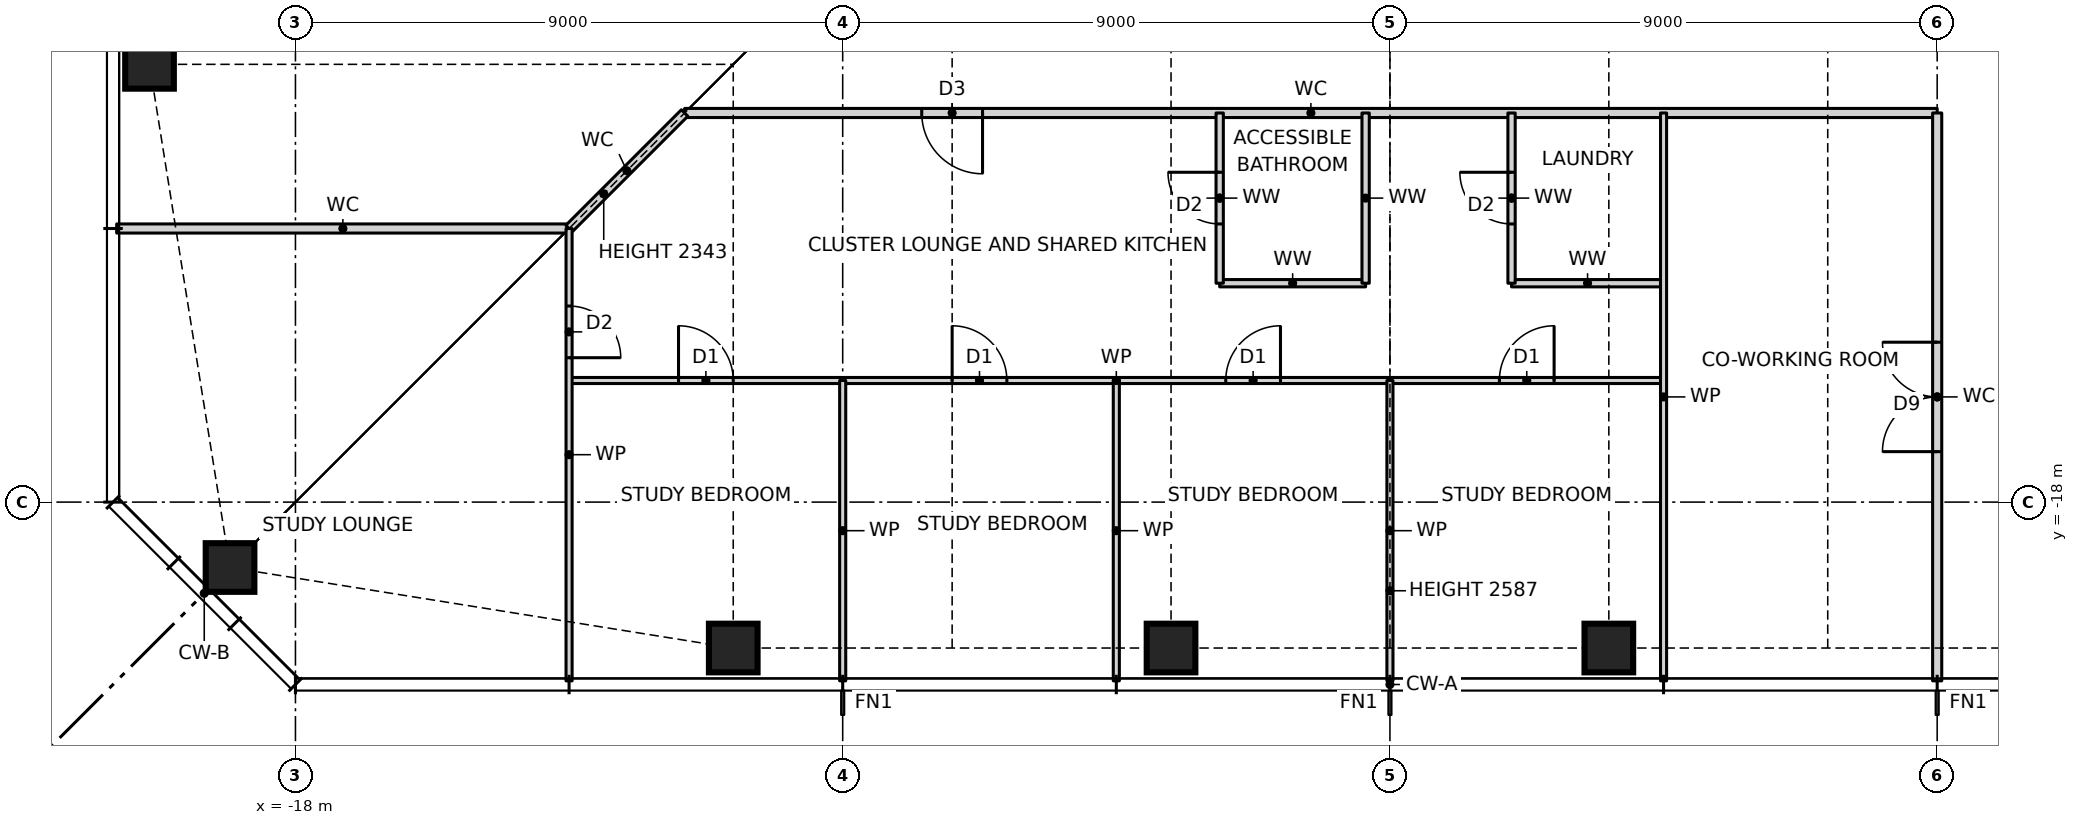
"""IFC4 building model, lengths in metres.
Left out: names, types, materials, properties, quantities, classifications, styles, units other than length and angle.
Written with IfcOpenShell. Run it as: python <this file> out.ifc"""

import sys

from ifc_helpers import new_model, si_unit, direction, frame, frame_2d, origin, origin_2d, place, context, subcontext, project, spatial, rectangle, hollow_rectangle, extrude, element, fill, save


model = new_model("IFC4")
c1 = context("Model", 3, precision=1e-05, world=origin(), true_north=direction((0.0, 1.0)))
c2 = subcontext(c1, "Body", "Model", "MODEL_VIEW")
j1 = project(units=[si_unit("LENGTHUNIT", "METRE"), si_unit("PLANEANGLEUNIT", "RADIAN")], contexts=[c1])
p1 = place(None, origin())
s1 = spatial("IfcSite", under=j1, at=p1, CompositionType="ELEMENT")
p2 = place(p1, origin())
s2 = spatial("IfcBuilding", under=s1, at=p2, CompositionType="ELEMENT")
p3 = place(p2, frame((0.0, 0.0, 115.5)))
s3 = spatial("IfcBuildingStorey", under=s2, at=p3, CompositionType="ELEMENT", Elevation=115.5)
for number, where, z_axis, x_axis in (
    (1, (-19.076, -19.076, 0.0), (0.0, 0.0, 1.0), (1.0, 0.0, 0.0)),
    (2, (-10.8, -20.4, 0.0), (0.0, 0.0, 1.0), (1.0, 0.0, 0.0)),
    (3, (-3.6, -20.4, 0.0), (0.0, 0.0, 1.0), (1.0, 0.0, 0.0)),
    (4, (3.6, -20.4, 0.0), (0.0, 0.0, 1.0), (1.0, 0.0, 0.0)),
    (5, (-20.4, -10.8, 0.0), (0.0, 0.0, 1.0), (1.0, 0.0, 0.0)),
):
    element("IfcColumn", number, at=place(p3, frame(where, z_axis=z_axis, x_axis=x_axis)), inside=s3, PredefinedType="COLUMN", context=c2, shape_type="SweptSolid", body=[
        extrude(hollow_rectangle(XDim=0.8, YDim=0.8, WallThickness=0.07, at=origin_2d()), origin(), (0.0, 0.0, 1.0), 3.5),
    ])
p4 = place(p3, frame((-13.5, -16.0, 0.0), z_axis=(0.0, 0.0, 1.0), x_axis=(1.0, 0.0, 0.0)))
e6 = element("IfcWall", 6, at=p4, inside=s3, PredefinedType="PARTITIONING", context=c2, shape_type="SweptSolid", body=[
    extrude(rectangle(XDim=18.0, YDim=0.1, at=frame_2d((9.0, 0.0))), origin(), (0.0, 0.0, 1.0), 3.27),
])
p5 = place(p4, frame((1.8, 0.0, 0.0)))
e7 = element("IfcOpeningElement", 7, at=p5, cuts=e6, PredefinedType="OPENING", context=c2, shape_type="SweptSolid", body=[
    extrude(rectangle(XDim=0.9, YDim=2.1, at=frame_2d((0.45, 1.05))), frame((0.0, 0.06, 0.0), z_axis=(0.0, -1.0, 0.0), x_axis=(1.0, 0.0, 0.0)), (0.0, 0.0, 1.0), 0.12),
])
p6 = place(p4, frame((6.3, 0.0, 0.0)))
e8 = element("IfcOpeningElement", 8, at=p6, cuts=e6, PredefinedType="OPENING", context=c2, shape_type="SweptSolid", body=[
    extrude(rectangle(XDim=0.9, YDim=2.1, at=frame_2d((0.45, 1.05))), frame((0.0, 0.06, 0.0), z_axis=(0.0, -1.0, 0.0), x_axis=(1.0, 0.0, 0.0)), (0.0, 0.0, 1.0), 0.12),
])
p7 = place(p4, frame((10.8, 0.0, 0.0)))
e9 = element("IfcOpeningElement", 9, at=p7, cuts=e6, PredefinedType="OPENING", context=c2, shape_type="SweptSolid", body=[
    extrude(rectangle(XDim=0.9, YDim=2.1, at=frame_2d((0.45, 1.05))), frame((0.0, 0.06, 0.0), z_axis=(0.0, -1.0, 0.0), x_axis=(1.0, 0.0, 0.0)), (0.0, 0.0, 1.0), 0.12),
])
p8 = place(p4, frame((15.3, 0.0, 0.0)))
e10 = element("IfcOpeningElement", 10, at=p8, cuts=e6, PredefinedType="OPENING", context=c2, shape_type="SweptSolid", body=[
    extrude(rectangle(XDim=0.9, YDim=2.1, at=frame_2d((0.45, 1.05))), frame((0.0, 0.06, 0.0), z_axis=(0.0, -1.0, 0.0), x_axis=(1.0, 0.0, 0.0)), (0.0, 0.0, 1.0), 0.12),
])
p9 = place(p3, frame((-2.8, -14.4, 0.0), z_axis=(0.0, 0.0, 1.0), x_axis=(1.0, 0.0, 0.0)))
e11 = element("IfcWall", 11, at=p9, inside=s3, PredefinedType="PARTITIONING", context=c2, shape_type="SweptSolid", body=[
    extrude(rectangle(XDim=2.4, YDim=0.12, at=frame_2d((1.2, 0.0))), origin(), (0.0, 0.0, 1.0), 3.27),
])
p10 = place(p3, frame((2.0, -14.4, 0.0), z_axis=(0.0, 0.0, 1.0), x_axis=(1.0, 0.0, 0.0)))
e12 = element("IfcWall", 12, at=p10, inside=s3, PredefinedType="PARTITIONING", context=c2, shape_type="SweptSolid", body=[
    extrude(rectangle(XDim=2.5, YDim=0.12, at=frame_2d((1.25, 0.0))), origin(), (0.0, 0.0, 1.0), 3.27),
])
p11 = place(p3, frame((-20.94, -13.5, 0.0), z_axis=(0.0, 0.0, 1.0), x_axis=(1.0, 0.0, 0.0)))
e13 = element("IfcWall", 13, at=p11, inside=s3, PredefinedType="PARTITIONING", context=c2, shape_type="SweptSolid", body=[
    extrude(rectangle(XDim=7.44, YDim=0.15, at=frame_2d((3.72, 0.0))), origin(), (0.0, 0.0, 1.0), 3.27),
])
p12 = place(p3, frame((-11.6, -11.6, 0.0), z_axis=(0.0, 0.0, 1.0), x_axis=(1.0, 0.0, 0.0)))
e14 = element("IfcWall", 14, at=p12, inside=s3, PredefinedType="PARTITIONING", context=c2, shape_type="SweptSolid", body=[
    extrude(rectangle(XDim=20.6, YDim=0.15, at=frame_2d((10.3, 0.0))), origin(), (0.0, 0.0, 1.0), 3.27),
])
p13 = place(p12, frame((3.9, 0.0, 0.0)))
e15 = element("IfcOpeningElement", 15, at=p13, cuts=e14, PredefinedType="OPENING", context=c2, shape_type="SweptSolid", body=[
    extrude(rectangle(XDim=1.0, YDim=2.1, at=frame_2d((0.5, 1.05))), frame((0.0, 0.085, 0.0), z_axis=(0.0, -1.0, 0.0), x_axis=(1.0, 0.0, 0.0)), (0.0, 0.0, 1.0), 0.17),
])
p14 = place(p3, frame((-13.5, -13.5, 0.0), z_axis=(0.0, 0.0, 1.0), x_axis=(0.707106781187, 0.707106781187, 0.0)))
e16 = element("IfcWall", 16, at=p14, inside=s3, PredefinedType="PARTITIONING", context=c2, shape_type="SweptSolid", body=[
    extrude(rectangle(XDim=2.687, YDim=0.15, at=frame_2d((1.343, 0.0))), origin(), (0.0, 0.0, 1.0), 2.343),
])
p15 = place(p3, frame((9.0, -20.94, 0.0), z_axis=(0.0, 0.0, 1.0), x_axis=(0.0, 1.0, 0.0)))
e17 = element("IfcWall", 17, at=p15, inside=s3, PredefinedType="PARTITIONING", context=c2, shape_type="SweptSolid", body=[
    extrude(rectangle(XDim=9.34, YDim=0.15, at=frame_2d((4.67, 0.0))), origin(), (0.0, 0.0, 1.0), 3.27),
])
p16 = place(p15, frame((3.77, 0.0, 0.0)))
e18 = element("IfcOpeningElement", 18, at=p16, cuts=e17, PredefinedType="OPENING", context=c2, shape_type="SweptSolid", body=[
    extrude(rectangle(XDim=1.8, YDim=2.1, at=frame_2d((0.9, 1.05))), frame((0.0, 0.085, 0.0), z_axis=(0.0, -1.0, 0.0), x_axis=(1.0, 0.0, 0.0)), (0.0, 0.0, 1.0), 0.17),
])
p17 = place(p3, frame((4.5, -20.94, 0.0), z_axis=(0.0, 0.0, 1.0), x_axis=(0.0, 1.0, 0.0)))
e19 = element("IfcWall", 19, at=p17, inside=s3, PredefinedType="PARTITIONING", context=c2, shape_type="SweptSolid", body=[
    extrude(rectangle(XDim=9.34, YDim=0.1, at=frame_2d((4.67, 0.0))), origin(), (0.0, 0.0, 1.0), 3.27),
])
p18 = place(p3, frame((2.0, -14.4, 0.0), z_axis=(0.0, 0.0, 1.0), x_axis=(0.0, 1.0, 0.0)))
e20 = element("IfcWall", 20, at=p18, inside=s3, PredefinedType="PARTITIONING", context=c2, shape_type="SweptSolid", body=[
    extrude(rectangle(XDim=2.8, YDim=0.12, at=frame_2d((1.4, 0.0))), origin(), (0.0, 0.0, 1.0), 3.27),
])
p19 = place(p18, frame((0.975, 0.0, 0.0)))
e21 = element("IfcOpeningElement", 21, at=p19, cuts=e20, PredefinedType="OPENING", context=c2, shape_type="SweptSolid", body=[
    extrude(rectangle(XDim=0.85, YDim=2.1, at=frame_2d((0.425, 1.05))), frame((0.0, 0.07, 0.0), z_axis=(0.0, -1.0, 0.0), x_axis=(1.0, 0.0, 0.0)), (0.0, 0.0, 1.0), 0.14),
])
p20 = place(p3, frame((0.0, -20.94, 0.0), z_axis=(0.0, 0.0, 1.0), x_axis=(0.0, 1.0, 0.0)))
e22 = element("IfcWall", 22, at=p20, inside=s3, PredefinedType="PARTITIONING", context=c2, shape_type="SweptSolid", body=[
    extrude(rectangle(XDim=4.94, YDim=0.1, at=frame_2d((2.47, 0.0))), origin(), (0.0, 0.0, 1.0), 2.587),
])
p21 = place(p3, frame((-0.4, -14.4, 0.0), z_axis=(0.0, 0.0, 1.0), x_axis=(0.0, 1.0, 0.0)))
e23 = element("IfcWall", 23, at=p21, inside=s3, PredefinedType="PARTITIONING", context=c2, shape_type="SweptSolid", body=[
    extrude(rectangle(XDim=2.8, YDim=0.12, at=frame_2d((1.4, 0.0))), origin(), (0.0, 0.0, 1.0), 3.27),
])
p22 = place(p3, frame((-2.8, -14.4, 0.0), z_axis=(0.0, 0.0, 1.0), x_axis=(0.0, 1.0, 0.0)))
e24 = element("IfcWall", 24, at=p22, inside=s3, PredefinedType="PARTITIONING", context=c2, shape_type="SweptSolid", body=[
    extrude(rectangle(XDim=2.8, YDim=0.12, at=frame_2d((1.4, 0.0))), origin(), (0.0, 0.0, 1.0), 3.27),
])
p23 = place(p22, frame((0.975, 0.0, 0.0)))
e25 = element("IfcOpeningElement", 25, at=p23, cuts=e24, PredefinedType="OPENING", context=c2, shape_type="SweptSolid", body=[
    extrude(rectangle(XDim=0.85, YDim=2.1, at=frame_2d((0.425, 1.05))), frame((0.0, 0.07, 0.0), z_axis=(0.0, -1.0, 0.0), x_axis=(1.0, 0.0, 0.0)), (0.0, 0.0, 1.0), 0.14),
])
for number, where, z_axis, x_axis in (
    (26, (-4.5, -20.94, 0.0), (0.0, 0.0, 1.0), (0.0, 1.0, 0.0)),
    (27, (-9.0, -20.94, 0.0), (0.0, 0.0, 1.0), (0.0, 1.0, 0.0)),
):
    element("IfcWall", number, at=place(p3, frame(where, z_axis=z_axis, x_axis=x_axis)), inside=s3, PredefinedType="PARTITIONING", context=c2, shape_type="SweptSolid", body=[
        extrude(rectangle(XDim=4.94, YDim=0.1, at=frame_2d((2.47, 0.0))), origin(), (0.0, 0.0, 1.0), 3.27),
    ])
p24 = place(p3, frame((-13.5, -20.94, 0.0), z_axis=(0.0, 0.0, 1.0), x_axis=(0.0, 1.0, 0.0)))
e28 = element("IfcWall", 28, at=p24, inside=s3, PredefinedType="PARTITIONING", context=c2, shape_type="SweptSolid", body=[
    extrude(rectangle(XDim=7.44, YDim=0.1, at=frame_2d((3.72, 0.0))), origin(), (0.0, 0.0, 1.0), 3.27),
])
p25 = place(p24, frame((5.315, 0.0, 0.0)))
e29 = element("IfcOpeningElement", 29, at=p25, cuts=e28, PredefinedType="OPENING", context=c2, shape_type="SweptSolid", body=[
    extrude(rectangle(XDim=0.85, YDim=2.1, at=frame_2d((0.425, 1.05))), frame((0.0, 0.06, 0.0), z_axis=(0.0, -1.0, 0.0), x_axis=(1.0, 0.0, 0.0)), (0.0, 0.0, 1.0), 0.12),
])
p26 = place(p5, origin())
e30 = element("IfcDoor", 30, at=p26, inside=s3, OperationType="SINGLE_SWING_LEFT", PredefinedType="DOOR", context=c2, shape_type="SweptSolid", body=[
    extrude(rectangle(XDim=0.9, YDim=2.1, at=frame_2d((0.45, 1.05))), frame((0.0, 0.025, 0.0), z_axis=(0.0, -1.0, 0.0), x_axis=(1.0, 0.0, 0.0)), (0.0, 0.0, 1.0), 0.05),
])
fill(e7, e30)
p27 = place(p6, origin())
e31 = element("IfcDoor", 31, at=p27, inside=s3, OperationType="SINGLE_SWING_LEFT", PredefinedType="DOOR", context=c2, shape_type="SweptSolid", body=[
    extrude(rectangle(XDim=0.9, YDim=2.1, at=frame_2d((0.45, 1.05))), frame((0.0, 0.025, 0.0), z_axis=(0.0, -1.0, 0.0), x_axis=(1.0, 0.0, 0.0)), (0.0, 0.0, 1.0), 0.05),
])
fill(e8, e31)
p28 = place(p7, origin())
e32 = element("IfcDoor", 32, at=p28, inside=s3, OperationType="SINGLE_SWING_RIGHT", PredefinedType="DOOR", context=c2, shape_type="SweptSolid", body=[
    extrude(rectangle(XDim=0.9, YDim=2.1, at=frame_2d((0.45, 1.05))), frame((0.0, 0.025, 0.0), z_axis=(0.0, -1.0, 0.0), x_axis=(1.0, 0.0, 0.0)), (0.0, 0.0, 1.0), 0.05),
])
fill(e9, e32)
p29 = place(p8, origin())
e33 = element("IfcDoor", 33, at=p29, inside=s3, OperationType="SINGLE_SWING_RIGHT", PredefinedType="DOOR", context=c2, shape_type="SweptSolid", body=[
    extrude(rectangle(XDim=0.9, YDim=2.1, at=frame_2d((0.45, 1.05))), frame((0.0, 0.025, 0.0), z_axis=(0.0, -1.0, 0.0), x_axis=(1.0, 0.0, 0.0)), (0.0, 0.0, 1.0), 0.05),
])
fill(e10, e33)
p30 = place(p13, frame((1.0, 0.0, 0.0), z_axis=(0.0, 0.0, 1.0), x_axis=(-1.0, 0.0, 0.0)))
e34 = element("IfcDoor", 34, at=p30, inside=s3, OperationType="SINGLE_SWING_LEFT", PredefinedType="DOOR", context=c2, shape_type="SweptSolid", body=[
    extrude(rectangle(XDim=1.0, YDim=2.1, at=frame_2d((0.5, 1.05))), frame((0.0, 0.025, 0.0), z_axis=(0.0, -1.0, 0.0), x_axis=(1.0, 0.0, 0.0)), (0.0, 0.0, 1.0), 0.05),
])
fill(e15, e34)
p31 = place(p23, origin())
e35 = element("IfcDoor", 35, at=p31, inside=s3, OperationType="SINGLE_SWING_RIGHT", PredefinedType="DOOR", context=c2, shape_type="SweptSolid", body=[
    extrude(rectangle(XDim=0.85, YDim=2.1, at=frame_2d((0.425, 1.05))), frame((0.0, 0.025, 0.0), z_axis=(0.0, -1.0, 0.0), x_axis=(1.0, 0.0, 0.0)), (0.0, 0.0, 1.0), 0.05),
])
fill(e25, e35)
p32 = place(p19, origin())
e36 = element("IfcDoor", 36, at=p32, inside=s3, OperationType="SINGLE_SWING_RIGHT", PredefinedType="DOOR", context=c2, shape_type="SweptSolid", body=[
    extrude(rectangle(XDim=0.85, YDim=2.1, at=frame_2d((0.425, 1.05))), frame((0.0, 0.025, 0.0), z_axis=(0.0, -1.0, 0.0), x_axis=(1.0, 0.0, 0.0)), (0.0, 0.0, 1.0), 0.05),
])
fill(e21, e36)
p33 = place(p16, origin())
e37 = element("IfcDoor", 37, at=p33, inside=s3, OperationType="DOUBLE_DOOR_SINGLE_SWING", PredefinedType="DOOR", context=c2, shape_type="SweptSolid", body=[
    extrude(rectangle(XDim=1.8, YDim=2.1, at=frame_2d((0.9, 1.05))), frame((0.0, 0.025, 0.0), z_axis=(0.0, -1.0, 0.0), x_axis=(1.0, 0.0, 0.0)), (0.0, 0.0, 1.0), 0.05),
])
fill(e18, e37)
p34 = place(p25, frame((0.85, 0.0, 0.0), z_axis=(0.0, 0.0, 1.0), x_axis=(-1.0, 0.0, 0.0)))
e38 = element("IfcDoor", 38, at=p34, inside=s3, OperationType="SINGLE_SWING_RIGHT", PredefinedType="DOOR", context=c2, shape_type="SweptSolid", body=[
    extrude(rectangle(XDim=0.85, YDim=2.1, at=frame_2d((0.425, 1.05))), frame((0.0, 0.025, 0.0), z_axis=(0.0, -1.0, 0.0), x_axis=(1.0, 0.0, 0.0)), (0.0, 0.0, 1.0), 0.05),
])
fill(e29, e38)
save(model, sys.argv[1])
